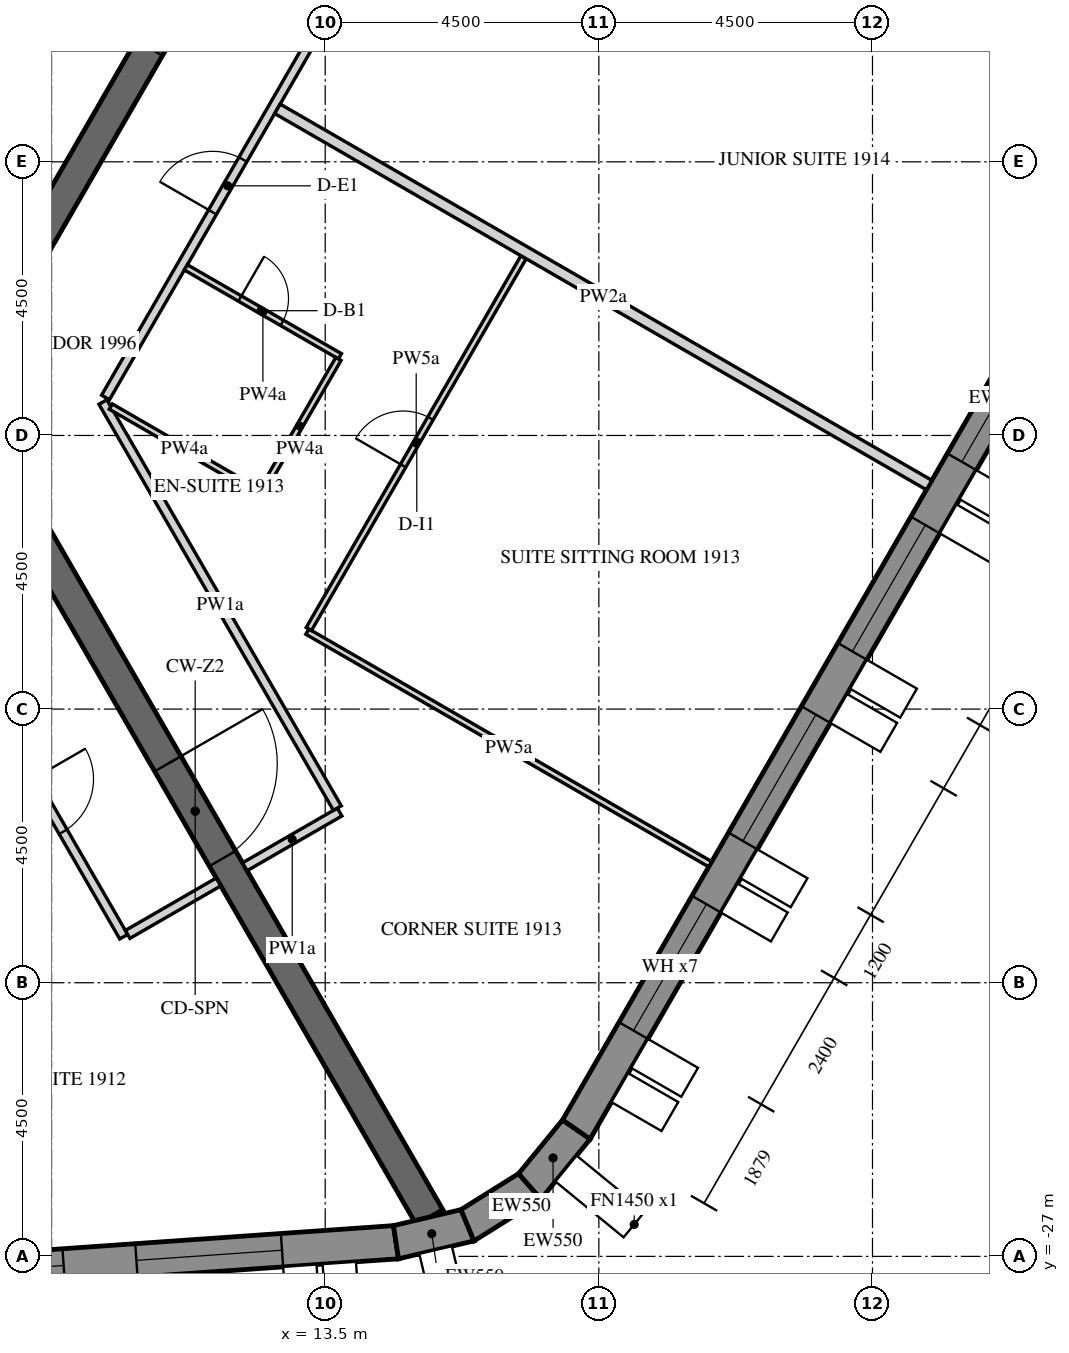
"""IFC4 building model, lengths in metres.
Left out: names, types, materials, properties, quantities, classifications, styles, units other than length and angle.
Written with IfcOpenShell. Run it as: python <this file> out.ifc"""

import sys

from ifc_helpers import new_model, si_unit, direction, frame, frame_2d, origin, place, context, subcontext, project, spatial, polyline, rectangle, outline, extrude, element, fill, save


model = new_model("IFC4")
c1 = context("Model", 3, precision=1e-05, world=origin(), true_north=direction((0.0, 1.0)))
c2 = subcontext(c1, "Body", "Model", "MODEL_VIEW")
j1 = project(units=[si_unit("LENGTHUNIT", "METRE"), si_unit("PLANEANGLEUNIT", "RADIAN")], contexts=[c1])
p1 = place(None, origin())
s1 = spatial("IfcSite", under=j1, at=p1, CompositionType="ELEMENT")
p2 = place(p1, origin())
s2 = spatial("IfcBuilding", under=s1, at=p2, CompositionType="ELEMENT")
p3 = place(p2, frame((0.0, 0.0, 238.5)))
s3 = spatial("IfcBuildingStorey", under=s2, at=p3, CompositionType="ELEMENT", Elevation=238.5)
p4 = place(p3, frame((-13.026, -28.704, -0.15), z_axis=(0.0, 0.0, 1.0), x_axis=(0.99756406806, 0.069756219185, 0.0)))
e1 = element("IfcWall", 1, at=p4, inside=s3, PredefinedType="SOLIDWALL", context=c2, shape_type="SweptSolid", body=[
    extrude(outline(polyline([(-0.026, -0.275), (27.78, -0.275), (27.735, 0.275), (0.026, 0.275), (-0.026, -0.275)])), origin(), (0.0, 0.0, 1.0), 3.9),
])
p5 = place(p4, frame((1.879, 0.0, 1.05)))
e2 = element("IfcOpeningElement", 2, at=p5, cuts=e1, PredefinedType="OPENING", context=c2, shape_type="SweptSolid", body=[
    extrude(rectangle(XDim=2.4, YDim=2.4, at=frame_2d((1.2, 1.2))), frame((0.0, 0.285, 0.0), z_axis=(0.0, -1.0, 0.0), x_axis=(1.0, 0.0, 0.0)), (0.0, 0.0, 1.0), 0.57),
])
p6 = place(p4, frame((5.479, 0.0, 1.05)))
e3 = element("IfcOpeningElement", 3, at=p6, cuts=e1, PredefinedType="OPENING", context=c2, shape_type="SweptSolid", body=[
    extrude(rectangle(XDim=2.4, YDim=2.4, at=frame_2d((1.2, 1.2))), frame((0.0, 0.285, 0.0), z_axis=(0.0, -1.0, 0.0), x_axis=(1.0, 0.0, 0.0)), (0.0, 0.0, 1.0), 0.57),
])
p7 = place(p4, frame((9.079, 0.0, 1.05)))
e4 = element("IfcOpeningElement", 4, at=p7, cuts=e1, PredefinedType="OPENING", context=c2, shape_type="SweptSolid", body=[
    extrude(rectangle(XDim=2.4, YDim=2.4, at=frame_2d((1.2, 1.2))), frame((0.0, 0.285, 0.0), z_axis=(0.0, -1.0, 0.0), x_axis=(1.0, 0.0, 0.0)), (0.0, 0.0, 1.0), 0.57),
])
p8 = place(p4, frame((12.679, 0.0, 1.05)))
e5 = element("IfcOpeningElement", 5, at=p8, cuts=e1, PredefinedType="OPENING", context=c2, shape_type="SweptSolid", body=[
    extrude(rectangle(XDim=2.4, YDim=2.4, at=frame_2d((1.2, 1.2))), frame((0.0, 0.285, 0.0), z_axis=(0.0, -1.0, 0.0), x_axis=(1.0, 0.0, 0.0)), (0.0, 0.0, 1.0), 0.57),
])
p9 = place(p4, frame((16.279, 0.0, 1.05)))
e6 = element("IfcOpeningElement", 6, at=p9, cuts=e1, PredefinedType="OPENING", context=c2, shape_type="SweptSolid", body=[
    extrude(rectangle(XDim=2.4, YDim=2.4, at=frame_2d((1.2, 1.2))), frame((0.0, 0.285, 0.0), z_axis=(0.0, -1.0, 0.0), x_axis=(1.0, 0.0, 0.0)), (0.0, 0.0, 1.0), 0.57),
])
p10 = place(p4, frame((19.879, 0.0, 1.05)))
e7 = element("IfcOpeningElement", 7, at=p10, cuts=e1, PredefinedType="OPENING", context=c2, shape_type="SweptSolid", body=[
    extrude(rectangle(XDim=2.4, YDim=2.4, at=frame_2d((1.2, 1.2))), frame((0.0, 0.285, 0.0), z_axis=(0.0, -1.0, 0.0), x_axis=(1.0, 0.0, 0.0)), (0.0, 0.0, 1.0), 0.57),
])
p11 = place(p4, frame((23.479, 0.0, 1.05)))
e8 = element("IfcOpeningElement", 8, at=p11, cuts=e1, PredefinedType="OPENING", context=c2, shape_type="SweptSolid", body=[
    extrude(rectangle(XDim=2.4, YDim=2.4, at=frame_2d((1.2, 1.2))), frame((0.0, 0.285, 0.0), z_axis=(0.0, -1.0, 0.0), x_axis=(1.0, 0.0, 0.0)), (0.0, 0.0, 1.0), 0.57),
])
p12 = place(p3, frame((14.664, -26.767, -0.15), z_axis=(0.0, 0.0, 1.0), x_axis=(0.973063591128, 0.230536868247, 0.0)))
e9 = element("IfcWall", 9, at=p12, inside=s3, PredefinedType="SOLIDWALL", context=c2, shape_type="SweptSolid", body=[
    extrude(outline(polyline([(-0.022, -0.275), (1.253, -0.275), (1.163, 0.275), (0.022, 0.275), (-0.022, -0.275)])), origin(), (0.0, 0.0, 1.0), 3.9),
])
p13 = place(p3, frame((15.84, -26.489, -0.15), z_axis=(0.0, 0.0, 1.0), x_axis=(0.848009655012, 0.52998077796, 0.0)))
e10 = element("IfcWall", 10, at=p13, inside=s3, PredefinedType="SOLIDWALL", context=c2, shape_type="SweptSolid", body=[
    extrude(outline(polyline([(-0.045, -0.275), (1.253, -0.275), (1.163, 0.275), (0.045, 0.275), (-0.045, -0.275)])), origin(), (0.0, 0.0, 1.0), 3.9),
])
p14 = place(p3, frame((16.864, -25.848, -0.15), z_axis=(0.0, 0.0, 1.0), x_axis=(0.633842757806, 0.773461930787, 0.0)))
e11 = element("IfcWall", 11, at=p14, inside=s3, PredefinedType="SOLIDWALL", context=c2, shape_type="SweptSolid", body=[
    extrude(outline(polyline([(-0.045, -0.275), (1.231, -0.275), (1.186, 0.275), (0.045, 0.275), (-0.045, -0.275)])), origin(), (0.0, 0.0, 1.0), 3.9),
])
p15 = place(p3, frame((17.63, -24.914, -0.15), z_axis=(0.0, 0.0, 1.0), x_axis=(0.499998569178, 0.866026229868, 0.0)))
e12 = element("IfcWall", 12, at=p15, inside=s3, PredefinedType="SOLIDWALL", context=c2, shape_type="SweptSolid", body=[
    extrude(outline(polyline([(-0.022, -0.275), (27.783, -0.275), (27.732, 0.275), (0.022, 0.275), (-0.022, -0.275)])), origin(), (0.0, 0.0, 1.0), 3.9),
])
p16 = place(p15, frame((1.879, 0.0, 1.05)))
e13 = element("IfcOpeningElement", 13, at=p16, cuts=e12, PredefinedType="OPENING", context=c2, shape_type="SweptSolid", body=[
    extrude(rectangle(XDim=2.4, YDim=2.4, at=frame_2d((1.2, 1.2))), frame((0.0, 0.285, 0.0), z_axis=(0.0, -1.0, 0.0), x_axis=(1.0, 0.0, 0.0)), (0.0, 0.0, 1.0), 0.57),
])
p17 = place(p15, frame((5.479, 0.0, 1.05)))
e14 = element("IfcOpeningElement", 14, at=p17, cuts=e12, PredefinedType="OPENING", context=c2, shape_type="SweptSolid", body=[
    extrude(rectangle(XDim=2.4, YDim=2.4, at=frame_2d((1.2, 1.2))), frame((0.0, 0.285, 0.0), z_axis=(0.0, -1.0, 0.0), x_axis=(1.0, 0.0, 0.0)), (0.0, 0.0, 1.0), 0.57),
])
p18 = place(p15, frame((9.079, 0.0, 1.05)))
e15 = element("IfcOpeningElement", 15, at=p18, cuts=e12, PredefinedType="OPENING", context=c2, shape_type="SweptSolid", body=[
    extrude(rectangle(XDim=2.4, YDim=2.4, at=frame_2d((1.2, 1.2))), frame((0.0, 0.285, 0.0), z_axis=(0.0, -1.0, 0.0), x_axis=(1.0, 0.0, 0.0)), (0.0, 0.0, 1.0), 0.57),
])
p19 = place(p15, frame((12.679, 0.0, 1.05)))
e16 = element("IfcOpeningElement", 16, at=p19, cuts=e12, PredefinedType="OPENING", context=c2, shape_type="SweptSolid", body=[
    extrude(rectangle(XDim=2.4, YDim=2.4, at=frame_2d((1.2, 1.2))), frame((0.0, 0.285, 0.0), z_axis=(0.0, -1.0, 0.0), x_axis=(1.0, 0.0, 0.0)), (0.0, 0.0, 1.0), 0.57),
])
p20 = place(p15, frame((16.279, 0.0, 1.05)))
e17 = element("IfcOpeningElement", 17, at=p20, cuts=e12, PredefinedType="OPENING", context=c2, shape_type="SweptSolid", body=[
    extrude(rectangle(XDim=2.4, YDim=2.4, at=frame_2d((1.2, 1.2))), frame((0.0, 0.285, 0.0), z_axis=(0.0, -1.0, 0.0), x_axis=(1.0, 0.0, 0.0)), (0.0, 0.0, 1.0), 0.57),
])
p21 = place(p15, frame((19.879, 0.0, 1.05)))
e18 = element("IfcOpeningElement", 18, at=p21, cuts=e12, PredefinedType="OPENING", context=c2, shape_type="SweptSolid", body=[
    extrude(rectangle(XDim=2.4, YDim=2.4, at=frame_2d((1.2, 1.2))), frame((0.0, 0.285, 0.0), z_axis=(0.0, -1.0, 0.0), x_axis=(1.0, 0.0, 0.0)), (0.0, 0.0, 1.0), 0.57),
])
p22 = place(p15, frame((23.479, 0.0, 1.05)))
e19 = element("IfcOpeningElement", 19, at=p22, cuts=e12, PredefinedType="OPENING", context=c2, shape_type="SweptSolid", body=[
    extrude(rectangle(XDim=2.4, YDim=2.4, at=frame_2d((1.2, 1.2))), frame((0.0, 0.285, 0.0), z_axis=(0.0, -1.0, 0.0), x_axis=(1.0, 0.0, 0.0)), (0.0, 0.0, 1.0), 0.57),
])
p23 = place(p3, frame((7.361, -12.75, -0.15), z_axis=(0.0, 0.0, 1.0), x_axis=(0.50000571537, 0.866022103989, 0.0)))
e20 = element("IfcWall", 20, at=p23, inside=s3, PredefinedType="SHEAR", context=c2, shape_type="SweptSolid", body=[
    extrude(outline(polyline([(-0.144, -0.25), (14.867, -0.25), (14.578, 0.25), (0.144, 0.25), (-0.144, -0.25)])), origin(), (0.0, 0.0, 1.0), 3.9),
])
p24 = place(p23, frame((6.49, 0.0, 0.15)))
e21 = element("IfcOpeningElement", 21, at=p24, cuts=e20, PredefinedType="OPENING", context=c2, shape_type="SweptSolid", body=[
    extrude(rectangle(XDim=1.8, YDim=2.4, at=frame_2d((0.9, 1.2))), frame((0.0, 0.26, 0.0), z_axis=(0.0, -1.0, 0.0), x_axis=(1.0, 0.0, 0.0)), (0.0, 0.0, 1.0), 0.52),
])
p25 = place(p3, frame((7.506, -13.0, -0.15), z_axis=(0.0, 0.0, 1.0), x_axis=(0.499988271576, -0.866032175087, 0.0)))
e22 = element("IfcWall", 22, at=p25, inside=s3, PredefinedType="SHEAR", context=c2, shape_type="SweptSolid", body=[
    extrude(rectangle(XDim=15.424, YDim=0.5, at=frame_2d((7.712, 0.0))), origin(), (0.0, 0.0, 1.0), 3.9),
])
p26 = place(p25, frame((6.812, 0.0, 0.15)))
e23 = element("IfcOpeningElement", 23, at=p26, cuts=e22, PredefinedType="OPENING", context=c2, shape_type="SweptSolid", body=[
    extrude(rectangle(XDim=1.8, YDim=2.4, at=frame_2d((0.9, 1.2))), frame((0.0, 0.26, 0.0), z_axis=(0.0, -1.0, 0.0), x_axis=(1.0, 0.0, 0.0)), (0.0, 0.0, 1.0), 0.52),
])
p27 = place(p3, frame((5.673, -9.825, -0.15), z_axis=(0.0, 0.0, 1.0), x_axis=(0.499995046907, 0.866028263435, 0.0)))
e24 = element("IfcWall", 24, at=p27, inside=s3, PredefinedType="SHEAR", context=c2, shape_type="SweptSolid", body=[
    extrude(outline(polyline([(-0.101, -0.175), (11.446, -0.175), (11.244, 0.175), (0.101, 0.175), (-0.101, -0.175)])), origin(), (0.0, 0.0, 1.0), 3.9),
])
p28 = place(p27, frame((4.801, 0.0, 0.15)))
e25 = element("IfcOpeningElement", 25, at=p28, cuts=e24, PredefinedType="OPENING", context=c2, shape_type="SweptSolid", body=[
    extrude(rectangle(XDim=1.8, YDim=2.4, at=frame_2d((0.9, 1.2))), frame((0.0, 0.185, 0.0), z_axis=(0.0, -1.0, 0.0), x_axis=(1.0, 0.0, 0.0)), (0.0, 0.0, 1.0), 0.37),
])
p29 = place(p3, frame((6.506, -15.368, 0.0), z_axis=(0.0, 0.0, 1.0), x_axis=(0.499995202058, -0.86602817386, 0.0)))
e26 = element("IfcWall", 26, at=p29, inside=s3, PredefinedType="PARTITIONING", context=c2, shape_type="SweptSolid", body=[
    extrude(rectangle(XDim=7.361, YDim=0.15, at=frame_2d((3.68, 0.0))), origin(), (0.0, 0.0, 1.0), 2.838),
])
p30 = place(p29, frame((4.368, 0.0, 0.0)))
e27 = element("IfcOpeningElement", 27, at=p30, cuts=e26, PredefinedType="OPENING", context=c2, shape_type="SweptSolid", body=[
    extrude(rectangle(XDim=1.0, YDim=2.1, at=frame_2d((0.5, 1.05))), frame((0.0, 0.085, 0.0), z_axis=(0.0, -1.0, 0.0), x_axis=(1.0, 0.0, 0.0)), (0.0, 0.0, 1.0), 0.17),
])
p31 = place(p3, frame((10.251, -21.705, 0.0), z_axis=(0.0, 0.0, 1.0), x_axis=(0.866013532718, 0.500020560727, 0.0)))
e28 = element("IfcWall", 28, at=p31, inside=s3, PredefinedType="PARTITIONING", context=c2, shape_type="SweptSolid", body=[
    extrude(rectangle(XDim=1.725, YDim=0.15, at=frame_2d((0.863, 0.0))), origin(), (0.0, 0.0, 1.0), 2.838),
])
p32 = place(p3, frame((12.178, -20.593, 0.0), z_axis=(0.0, 0.0, 1.0), x_axis=(0.866047807691, 0.499961193289, 0.0)))
e29 = element("IfcWall", 29, at=p32, inside=s3, PredefinedType="PARTITIONING", context=c2, shape_type="SweptSolid", body=[
    extrude(rectangle(XDim=1.8, YDim=0.15, at=frame_2d((0.9, 0.0))), origin(), (0.0, 0.0, 1.0), 2.838),
])
p33 = place(p3, frame((13.699, -19.628, 0.0), z_axis=(0.0, 0.0, 1.0), x_axis=(-0.499993780622, 0.866028994514, 0.0)))
e30 = element("IfcWall", 30, at=p33, inside=s3, PredefinedType="PARTITIONING", context=c2, shape_type="SweptSolid", body=[
    extrude(rectangle(XDim=7.711, YDim=0.15, at=frame_2d((3.855, 0.0))), origin(), (0.0, 0.0, 1.0), 2.838),
])
p34 = place(p3, frame((9.887, -12.875, 0.0), z_axis=(0.0, 0.0, 1.0), x_axis=(0.499998228944, 0.866026426302, 0.0)))
e31 = element("IfcWall", 31, at=p34, inside=s3, PredefinedType="PARTITIONING", context=c2, shape_type="SweptSolid", body=[
    extrude(rectangle(XDim=14.867, YDim=0.15, at=frame_2d((7.433, 0.0))), origin(), (0.0, 0.0, 1.0), 2.838),
])
p35 = place(p34, frame((3.519, 0.0, 0.0)))
e32 = element("IfcOpeningElement", 32, at=p35, cuts=e31, PredefinedType="OPENING", context=c2, shape_type="SweptSolid", body=[
    extrude(rectangle(XDim=1.0, YDim=2.1, at=frame_2d((0.5, 1.05))), frame((0.0, 0.085, 0.0), z_axis=(0.0, -1.0, 0.0), x_axis=(1.0, 0.0, 0.0)), (0.0, 0.0, 1.0), 0.17),
])
p36 = place(p34, frame((7.324, 0.0, 0.0)))
e33 = element("IfcOpeningElement", 33, at=p36, cuts=e31, PredefinedType="OPENING", context=c2, shape_type="SweptSolid", body=[
    extrude(rectangle(XDim=1.0, YDim=2.1, at=frame_2d((0.5, 1.05))), frame((0.0, 0.085, 0.0), z_axis=(0.0, -1.0, 0.0), x_axis=(1.0, 0.0, 0.0)), (0.0, 0.0, 1.0), 0.17),
])
p37 = place(p34, frame((13.717, 0.0, 0.0)))
e34 = element("IfcOpeningElement", 34, at=p37, cuts=e31, PredefinedType="OPENING", context=c2, shape_type="SweptSolid", body=[
    extrude(rectangle(XDim=1.0, YDim=2.1, at=frame_2d((0.5, 1.05))), frame((0.0, 0.085, 0.0), z_axis=(0.0, -1.0, 0.0), x_axis=(1.0, 0.0, 0.0)), (0.0, 0.0, 1.0), 0.17),
])
p38 = place(p3, frame((11.209, -10.736, 0.0), z_axis=(0.0, 0.0, 1.0), x_axis=(0.866046596414, -0.499963291492, 0.0)))
e35 = element("IfcWall", 35, at=p38, inside=s3, PredefinedType="PARTITIONING", context=c2, shape_type="SweptSolid", body=[
    extrude(rectangle(XDim=2.925, YDim=0.1, at=frame_2d((1.462, 0.0))), origin(), (0.0, 0.0, 1.0), 2.838),
])
p39 = place(p38, frame((1.025, 0.0, 0.0)))
e36 = element("IfcOpeningElement", 36, at=p39, cuts=e35, PredefinedType="OPENING", context=c2, shape_type="SweptSolid", body=[
    extrude(rectangle(XDim=0.8, YDim=2.1, at=frame_2d((0.4, 1.05))), frame((0.0, 0.06, 0.0), z_axis=(0.0, -1.0, 0.0), x_axis=(1.0, 0.0, 0.0)), (0.0, 0.0, 1.0), 0.12),
])
p40 = place(p3, frame((13.717, -12.242, 0.0), z_axis=(0.0, 0.0, 1.0), x_axis=(-0.499990435942, -0.866030925526, 0.0)))
e37 = element("IfcWall", 37, at=p40, inside=s3, PredefinedType="PARTITIONING", context=c2, shape_type="SweptSolid", body=[
    extrude(rectangle(XDim=2.55, YDim=0.1, at=frame_2d((1.275, 0.0))), origin(), (0.0, 0.0, 1.0), 2.838),
])
p41 = place(p3, frame((12.399, -14.425, 0.0), z_axis=(0.0, 0.0, 1.0), x_axis=(-0.866018616679, 0.500011755427, 0.0)))
e38 = element("IfcWall", 38, at=p41, inside=s3, PredefinedType="PARTITIONING", context=c2, shape_type="SweptSolid", body=[
    extrude(rectangle(XDim=2.8, YDim=0.1, at=frame_2d((1.4, 0.0))), origin(), (0.0, 0.0, 1.0), 2.838),
])
p42 = place(p3, frame((19.831, -20.551, 0.0), z_axis=(0.0, 0.0, 1.0), x_axis=(-0.866025084624, 0.500000552801, 0.0)))
e39 = element("IfcWall", 39, at=p42, inside=s3, PredefinedType="PARTITIONING", context=c2, shape_type="SweptSolid", body=[
    extrude(rectangle(XDim=7.65, YDim=0.1, at=frame_2d((3.825, 0.0))), origin(), (0.0, 0.0, 1.0), 2.838),
])
p43 = place(p3, frame((13.231, -16.683, 0.0), z_axis=(0.0, 0.0, 1.0), x_axis=(0.499995846692, 0.866027801685, 0.0)))
e40 = element("IfcWall", 40, at=p43, inside=s3, PredefinedType="PARTITIONING", context=c2, shape_type="SweptSolid", body=[
    extrude(rectangle(XDim=7.06, YDim=0.1, at=frame_2d((3.53, 0.0))), origin(), (0.0, 0.0, 1.0), 2.838),
])
p44 = place(p43, frame((3.1, 0.0, 0.0)))
e41 = element("IfcOpeningElement", 41, at=p44, cuts=e40, PredefinedType="OPENING", context=c2, shape_type="SweptSolid", body=[
    extrude(rectangle(XDim=0.9, YDim=2.1, at=frame_2d((0.45, 1.05))), frame((0.0, 0.06, 0.0), z_axis=(0.0, -1.0, 0.0), x_axis=(1.0, 0.0, 0.0)), (0.0, 0.0, 1.0), 0.12),
])
for number, where, z_axis, x_axis in (
    (42, (23.431, -14.316, 0.0), (0.0, 0.0, 1.0), (-0.866, 0.5, 0.0)),
    (43, (27.031, -8.08, 0.0), (0.0, 0.0, 1.0), (-0.866, 0.5, 0.0)),
):
    element("IfcWall", number, at=place(p3, frame(where, z_axis=z_axis, x_axis=x_axis)), inside=s3, PredefinedType="PARTITIONING", context=c2, shape_type="SweptSolid", body=[
        extrude(rectangle(XDim=12.375, YDim=0.18, at=frame_2d((6.188, 0.0))), origin(), (0.0, 0.0, 1.0), 2.838),
    ])
p45 = place(p10, frame((0.0, 0.205, 0.0)))
e44 = element("IfcWindow", 44, at=p45, inside=s3, PartitioningType="DOUBLE_PANEL_VERTICAL", PredefinedType="WINDOW", context=c2, shape_type="SweptSolid", body=[
    extrude(rectangle(XDim=2.4, YDim=2.4, at=frame_2d((1.2, 1.2))), frame((0.0, 0.03, 0.0), z_axis=(0.0, -1.0, 0.0), x_axis=(1.0, 0.0, 0.0)), (0.0, 0.0, 1.0), 0.06),
])
fill(e7, e44)
p46 = place(p11, frame((0.0, 0.205, 0.0)))
e45 = element("IfcWindow", 45, at=p46, inside=s3, PartitioningType="DOUBLE_PANEL_VERTICAL", PredefinedType="WINDOW", context=c2, shape_type="SweptSolid", body=[
    extrude(rectangle(XDim=2.4, YDim=2.4, at=frame_2d((1.2, 1.2))), frame((0.0, 0.03, 0.0), z_axis=(0.0, -1.0, 0.0), x_axis=(1.0, 0.0, 0.0)), (0.0, 0.0, 1.0), 0.06),
])
fill(e8, e45)
p47 = place(p16, frame((0.0, 0.205, 0.0)))
e46 = element("IfcWindow", 46, at=p47, inside=s3, PartitioningType="DOUBLE_PANEL_VERTICAL", PredefinedType="WINDOW", context=c2, shape_type="SweptSolid", body=[
    extrude(rectangle(XDim=2.4, YDim=2.4, at=frame_2d((1.2, 1.2))), frame((0.0, 0.03, 0.0), z_axis=(0.0, -1.0, 0.0), x_axis=(1.0, 0.0, 0.0)), (0.0, 0.0, 1.0), 0.06),
])
fill(e13, e46)
p48 = place(p17, frame((0.0, 0.205, 0.0)))
e47 = element("IfcWindow", 47, at=p48, inside=s3, PartitioningType="DOUBLE_PANEL_VERTICAL", PredefinedType="WINDOW", context=c2, shape_type="SweptSolid", body=[
    extrude(rectangle(XDim=2.4, YDim=2.4, at=frame_2d((1.2, 1.2))), frame((0.0, 0.03, 0.0), z_axis=(0.0, -1.0, 0.0), x_axis=(1.0, 0.0, 0.0)), (0.0, 0.0, 1.0), 0.06),
])
fill(e14, e47)
p49 = place(p18, frame((0.0, 0.205, 0.0)))
e48 = element("IfcWindow", 48, at=p49, inside=s3, PartitioningType="DOUBLE_PANEL_VERTICAL", PredefinedType="WINDOW", context=c2, shape_type="SweptSolid", body=[
    extrude(rectangle(XDim=2.4, YDim=2.4, at=frame_2d((1.2, 1.2))), frame((0.0, 0.03, 0.0), z_axis=(0.0, -1.0, 0.0), x_axis=(1.0, 0.0, 0.0)), (0.0, 0.0, 1.0), 0.06),
])
fill(e15, e48)
p50 = place(p19, frame((0.0, 0.205, 0.0)))
e49 = element("IfcWindow", 49, at=p50, inside=s3, PartitioningType="DOUBLE_PANEL_VERTICAL", PredefinedType="WINDOW", context=c2, shape_type="SweptSolid", body=[
    extrude(rectangle(XDim=2.4, YDim=2.4, at=frame_2d((1.2, 1.2))), frame((0.0, 0.03, 0.0), z_axis=(0.0, -1.0, 0.0), x_axis=(1.0, 0.0, 0.0)), (0.0, 0.0, 1.0), 0.06),
])
fill(e16, e49)
p51 = place(p26, origin())
e50 = element("IfcDoor", 50, at=p51, inside=s3, OperationType="DOUBLE_DOOR_SINGLE_SWING", PredefinedType="DOOR", context=c2, shape_type="SweptSolid", body=[
    extrude(rectangle(XDim=1.8, YDim=2.4, at=frame_2d((0.9, 1.2))), frame((0.0, 0.025, 0.0), z_axis=(0.0, -1.0, 0.0), x_axis=(1.0, 0.0, 0.0)), (0.0, 0.0, 1.0), 0.05),
])
fill(e23, e50)
p52 = place(p30, origin())
e51 = element("IfcDoor", 51, at=p52, inside=s3, OperationType="SINGLE_SWING_RIGHT", PredefinedType="DOOR", context=c2, shape_type="SweptSolid", body=[
    extrude(rectangle(XDim=1.0, YDim=2.1, at=frame_2d((0.5, 1.05))), frame((0.0, 0.025, 0.0), z_axis=(0.0, -1.0, 0.0), x_axis=(1.0, 0.0, 0.0)), (0.0, 0.0, 1.0), 0.05),
])
fill(e27, e51)
p53 = place(p35, origin())
e52 = element("IfcDoor", 52, at=p53, inside=s3, OperationType="SINGLE_SWING_RIGHT", PredefinedType="DOOR", context=c2, shape_type="SweptSolid", body=[
    extrude(rectangle(XDim=1.0, YDim=2.1, at=frame_2d((0.5, 1.05))), frame((0.0, 0.025, 0.0), z_axis=(0.0, -1.0, 0.0), x_axis=(1.0, 0.0, 0.0)), (0.0, 0.0, 1.0), 0.05),
])
fill(e32, e52)
p54 = place(p39, origin())
e53 = element("IfcDoor", 53, at=p54, inside=s3, OperationType="SINGLE_SWING_RIGHT", PredefinedType="DOOR", context=c2, shape_type="SweptSolid", body=[
    extrude(rectangle(XDim=0.8, YDim=2.1, at=frame_2d((0.4, 1.05))), frame((0.0, 0.025, 0.0), z_axis=(0.0, -1.0, 0.0), x_axis=(1.0, 0.0, 0.0)), (0.0, 0.0, 1.0), 0.05),
])
fill(e36, e53)
p55 = place(p44, origin())
e54 = element("IfcDoor", 54, at=p55, inside=s3, OperationType="SINGLE_SWING_LEFT", PredefinedType="DOOR", context=c2, shape_type="SweptSolid", body=[
    extrude(rectangle(XDim=0.9, YDim=2.1, at=frame_2d((0.45, 1.05))), frame((0.0, 0.025, 0.0), z_axis=(0.0, -1.0, 0.0), x_axis=(1.0, 0.0, 0.0)), (0.0, 0.0, 1.0), 0.05),
])
fill(e41, e54)
save(model, sys.argv[1])
